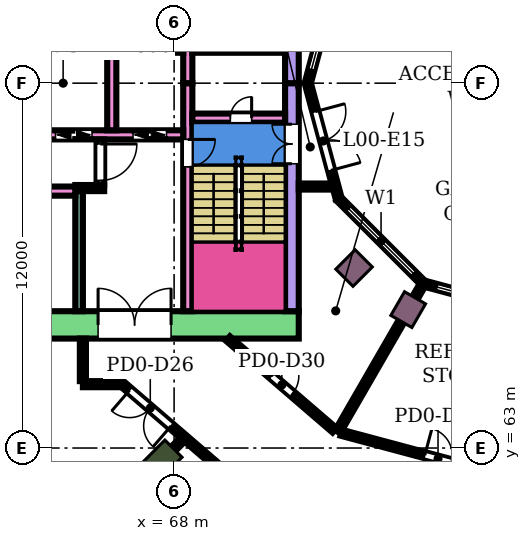
"""IFC4 building model, lengths in metres.
Left out: names, types, materials, properties, quantities, classifications, styles, units other than length and angle.
Written with IfcOpenShell. Run it as: python <this file> out.ifc"""

import sys

from ifc_helpers import new_model, si_unit, direction, frame, frame_2d, origin, origin_2d, place, context, subcontext, project, spatial, rectangle, extrude, element, fill, save


model = new_model("IFC4")
c1 = context("Model", 3, precision=1e-05, world=origin(), true_north=direction((0.0, 1.0)))
c2 = subcontext(c1, "Body", "Model", "MODEL_VIEW")
j1 = project(units=[si_unit("LENGTHUNIT", "METRE"), si_unit("PLANEANGLEUNIT", "RADIAN")], contexts=[c1])
p1 = place(None, origin())
s1 = spatial("IfcSite", under=j1, at=p1, CompositionType="ELEMENT")
p2 = place(p1, origin())
s2 = spatial("IfcBuilding", under=s1, at=p2, CompositionType="ELEMENT")
p3 = place(p2, origin())
s3 = spatial("IfcBuildingStorey", under=s2, at=p3, CompositionType="ELEMENT", Elevation=0.0)
p4 = place(p3, frame((67.555, 62.555, 0.0), z_axis=(0.0, 0.0, 1.0), x_axis=(-0.707106781187, -0.707106781187, 0.0)))
e1 = element("IfcColumn", 1, at=p4, inside=s3, PredefinedType="COLUMN", context=c2, shape_type="SweptSolid", body=[
    extrude(rectangle(XDim=1.2, YDim=0.8, at=origin_2d()), origin(), (0.0, 0.0, 1.0), 7.0),
])
for number, where, z_axis, x_axis in (
    (2, (73.919, 68.919, 0.0), (0.0, 0.0, 1.0), (-0.707, -0.707, 0.0)),
    (3, (75.7, 67.552, 0.0), (0.0, 0.0, 1.0), (-0.5, -0.866, 0.0)),
):
    element("IfcColumn", number, at=place(p3, frame(where, z_axis=z_axis, x_axis=x_axis)), inside=s3, PredefinedType="COLUMN", context=c2, shape_type="SweptSolid", body=[
        extrude(rectangle(XDim=0.9, YDim=0.8, at=origin_2d()), origin(), (0.0, 0.0, 1.0), 7.0),
    ])
p5 = place(p3, frame((72.1, 67.05, 0.0), z_axis=(0.0, 0.0, 1.0), x_axis=(-1.0, 0.0, 0.0)))
e4 = element("IfcWall", 4, at=p5, inside=s3, PredefinedType="SHEAR", context=c2, shape_type="SweptSolid", body=[
    extrude(rectangle(XDim=14.6, YDim=0.9, at=frame_2d((7.3, 0.0))), origin(), (0.0, 0.0, 1.0), 6.55),
])
p6 = place(p5, frame((4.2, 0.0, 0.0)))
e5 = element("IfcOpeningElement", 5, at=p6, cuts=e4, PredefinedType="OPENING", context=c2, shape_type="SweptSolid", body=[
    extrude(rectangle(XDim=2.4, YDim=2.4, at=frame_2d((1.2, 1.2))), frame((0.0, 0.46, 0.0), z_axis=(0.0, -1.0, 0.0), x_axis=(1.0, 0.0, 0.0)), (0.0, 0.0, 1.0), 0.92),
])
p7 = place(p3, frame((71.875, 75.0, 0.0), z_axis=(0.0, 0.0, 1.0), x_axis=(0.0, -1.0, 0.0)))
e6 = element("IfcWall", 6, at=p7, inside=s3, PredefinedType="SHEAR", context=c2, shape_type="SweptSolid", body=[
    extrude(rectangle(XDim=7.5, YDim=0.45, at=frame_2d((3.75, 0.0))), origin(), (0.0, 0.0, 1.0), 6.55),
])
p8 = place(p7, frame((1.35, 0.0, 0.0)))
e7 = element("IfcOpeningElement", 7, at=p8, cuts=e6, PredefinedType="OPENING", context=c2, shape_type="SweptSolid", body=[
    extrude(rectangle(XDim=1.3, YDim=2.4, at=frame_2d((0.65, 1.2))), frame((0.0, 0.235, 0.0), z_axis=(0.0, -1.0, 0.0), x_axis=(1.0, 0.0, 0.0)), (0.0, 0.0, 1.0), 0.47),
])
p9 = place(p3, frame((71.875, 82.5, 0.0), z_axis=(0.0, 0.0, 1.0), x_axis=(0.0, -1.0, 0.0)))
e8 = element("IfcWall", 8, at=p9, inside=s3, PredefinedType="SHEAR", context=c2, shape_type="SweptSolid", body=[
    extrude(rectangle(XDim=7.5, YDim=0.45, at=frame_2d((3.75, 0.0))), origin(), (0.0, 0.0, 1.0), 6.55),
])
p10 = place(p9, frame((0.05, 0.0, 0.0)))
e9 = element("IfcOpeningElement", 9, at=p10, cuts=e8, PredefinedType="OPENING", context=c2, shape_type="SweptSolid", body=[
    extrude(rectangle(XDim=1.3, YDim=2.4, at=frame_2d((0.65, 1.2))), frame((0.0, 0.235, 0.0), z_axis=(0.0, -1.0, 0.0), x_axis=(1.0, 0.0, 0.0)), (0.0, 0.0, 1.0), 0.47),
])
p11 = place(p3, frame((68.45, 75.0, 0.0), z_axis=(0.0, 0.0, 1.0), x_axis=(0.0, -1.0, 0.0)))
e10 = element("IfcWall", 10, at=p11, inside=s3, PredefinedType="SHEAR", context=c2, shape_type="SweptSolid", body=[
    extrude(rectangle(XDim=7.5, YDim=0.3, at=frame_2d((3.75, 0.0))), origin(), (0.0, 0.0, 1.0), 6.55),
])
p12 = place(p11, frame((1.85, 0.0, 0.0)))
e11 = element("IfcOpeningElement", 11, at=p12, cuts=e10, PredefinedType="OPENING", context=c2, shape_type="SweptSolid", body=[
    extrude(rectangle(XDim=0.9, YDim=2.1, at=frame_2d((0.45, 1.05))), frame((0.0, 0.16, 0.0), z_axis=(0.0, -1.0, 0.0), x_axis=(1.0, 0.0, 0.0)), (0.0, 0.0, 1.0), 0.32),
])
p13 = place(p3, frame((68.45, 82.5, 0.0), z_axis=(0.0, 0.0, 1.0), x_axis=(0.0, -1.0, 0.0)))
e12 = element("IfcWall", 12, at=p13, inside=s3, PredefinedType="SHEAR", context=c2, shape_type="SweptSolid", body=[
    extrude(rectangle(XDim=7.5, YDim=0.3, at=frame_2d((3.75, 0.0))), origin(), (0.0, 0.0, 1.0), 6.55),
])
p14 = place(p13, frame((0.15, 0.0, 0.0)))
e13 = element("IfcOpeningElement", 13, at=p14, cuts=e12, PredefinedType="OPENING", context=c2, shape_type="SweptSolid", body=[
    extrude(rectangle(XDim=0.9, YDim=2.1, at=frame_2d((0.45, 1.05))), frame((0.0, 0.16, 0.0), z_axis=(0.0, -1.0, 0.0), x_axis=(1.0, 0.0, 0.0)), (0.0, 0.0, 1.0), 0.32),
])
p15 = place(p3, frame((71.65, 73.85, 0.0), z_axis=(0.0, 0.0, 1.0), x_axis=(-1.0, 0.0, 0.0)))
e14 = element("IfcWall", 14, at=p15, inside=s3, PredefinedType="SHEAR", context=c2, shape_type="SweptSolid", body=[
    extrude(rectangle(XDim=3.05, YDim=0.3, at=frame_2d((1.525, 0.0))), origin(), (0.0, 0.0, 1.0), 6.55),
])
p16 = place(p15, frame((1.1, 0.0, 0.0)))
e15 = element("IfcOpeningElement", 15, at=p16, cuts=e14, PredefinedType="OPENING", context=c2, shape_type="SweptSolid", body=[
    extrude(rectangle(XDim=0.7, YDim=2.0, at=frame_2d((0.35, 1.0))), frame((0.0, 0.16, 0.0), z_axis=(0.0, -1.0, 0.0), x_axis=(1.0, 0.0, 0.0)), (0.0, 0.0, 1.0), 0.32),
])
p17 = place(p3, frame((71.65, 76.15, 0.0), z_axis=(0.0, 0.0, 1.0), x_axis=(-1.0, 0.0, 0.0)))
e16 = element("IfcWall", 16, at=p17, inside=s3, PredefinedType="SHEAR", context=c2, shape_type="SweptSolid", body=[
    extrude(rectangle(XDim=3.05, YDim=0.3, at=frame_2d((1.525, 0.0))), origin(), (0.0, 0.0, 1.0), 6.55),
])
p18 = place(p3, frame((68.3, 73.3, 0.0), z_axis=(0.0, 0.0, 1.0), x_axis=(-1.0, 0.0, 0.0)))
e17 = element("IfcWall", 17, at=p18, inside=s3, PredefinedType="SHEAR", context=c2, shape_type="SweptSolid", body=[
    extrude(rectangle(XDim=10.8, YDim=0.3, at=frame_2d((5.4, 0.0))), origin(), (0.0, 0.0, 1.0), 6.55),
])
p19 = place(p18, frame((0.55, 0.0, 0.0)))
e18 = element("IfcOpeningElement", 18, at=p19, cuts=e17, PredefinedType="OPENING", context=c2, shape_type="SweptSolid", body=[
    extrude(rectangle(XDim=1.1, YDim=2.1, at=frame_2d((0.55, 1.05))), frame((0.0, 0.16, 0.0), z_axis=(0.0, -1.0, 0.0), x_axis=(1.0, 0.0, 0.0)), (0.0, 0.0, 1.0), 0.32),
])
p20 = place(p18, frame((3.0, 0.0, 0.0)))
e19 = element("IfcOpeningElement", 19, at=p20, cuts=e17, PredefinedType="OPENING", context=c2, shape_type="SweptSolid", body=[
    extrude(rectangle(XDim=1.2, YDim=2.1, at=frame_2d((0.6, 1.05))), frame((0.0, 0.16, 0.0), z_axis=(0.0, -1.0, 0.0), x_axis=(1.0, 0.0, 0.0)), (0.0, 0.0, 1.0), 0.32),
])
p21 = place(p18, frame((5.5, 0.0, 0.0)))
e20 = element("IfcOpeningElement", 20, at=p21, cuts=e17, PredefinedType="OPENING", context=c2, shape_type="SweptSolid", body=[
    extrude(rectangle(XDim=1.2, YDim=2.1, at=frame_2d((0.6, 1.05))), frame((0.0, 0.16, 0.0), z_axis=(0.0, -1.0, 0.0), x_axis=(1.0, 0.0, 0.0)), (0.0, 0.0, 1.0), 0.32),
])
p22 = place(p18, frame((8.1, 0.0, 0.0)))
e21 = element("IfcOpeningElement", 21, at=p22, cuts=e17, PredefinedType="OPENING", context=c2, shape_type="SweptSolid", body=[
    extrude(rectangle(XDim=1.0, YDim=2.1, at=frame_2d((0.5, 1.05))), frame((0.0, 0.16, 0.0), z_axis=(0.0, -1.0, 0.0), x_axis=(1.0, 0.0, 0.0)), (0.0, 0.0, 1.0), 0.32),
])
p23 = place(p3, frame((65.95, 76.0, 0.0), z_axis=(0.0, 0.0, 1.0), x_axis=(0.0, -1.0, 0.0)))
e22 = element("IfcWall", 22, at=p23, inside=s3, PredefinedType="SHEAR", context=c2, shape_type="SweptSolid", body=[
    extrude(rectangle(XDim=2.55, YDim=0.3, at=frame_2d((1.275, 0.0))), origin(), (0.0, 0.0, 1.0), 6.55),
])
p24 = place(p3, frame((64.875, 71.45, 0.0), z_axis=(0.0, 0.0, 1.0), x_axis=(0.0, -1.0, 0.0)))
e23 = element("IfcWall", 23, at=p24, inside=s3, PredefinedType="SHEAR", context=c2, shape_type="SweptSolid", body=[
    extrude(rectangle(XDim=3.95, YDim=0.25, at=frame_2d((1.975, 0.0))), origin(), (0.0, 0.0, 1.0), 6.55),
])
p25 = place(p3, frame((65.7, 71.55, 0.0), z_axis=(0.0, 0.0, 1.0), x_axis=(-1.0, 0.0, 0.0)))
e24 = element("IfcWall", 24, at=p25, inside=s3, PredefinedType="SHEAR", context=c2, shape_type="SweptSolid", body=[
    extrude(rectangle(XDim=0.95, YDim=0.2, at=frame_2d((0.475, 0.0))), origin(), (0.0, 0.0, 1.0), 6.55),
])
p26 = place(p3, frame((65.575, 73.15, 0.0), z_axis=(0.0, 0.0, 1.0), x_axis=(0.0, -1.0, 0.0)))
e25 = element("IfcWall", 25, at=p26, inside=s3, PredefinedType="SHEAR", context=c2, shape_type="SweptSolid", body=[
    extrude(rectangle(XDim=1.5, YDim=0.25, at=frame_2d((0.75, 0.0))), origin(), (0.0, 0.0, 1.0), 6.55),
])
p27 = place(p26, frame((0.15, 0.0, 0.0)))
e26 = element("IfcOpeningElement", 26, at=p27, cuts=e25, PredefinedType="OPENING", context=c2, shape_type="SweptSolid", body=[
    extrude(rectangle(XDim=1.2, YDim=2.1, at=frame_2d((0.6, 1.05))), frame((0.0, 0.135, 0.0), z_axis=(0.0, -1.0, 0.0), x_axis=(1.0, 0.0, 0.0)), (0.0, 0.0, 1.0), 0.27),
])
p28 = place(p3, frame((64.75, 71.45, 0.0), z_axis=(0.0, 0.0, 1.0), x_axis=(-1.0, 0.0, 0.0)))
e27 = element("IfcWall", 27, at=p28, inside=s3, PredefinedType="SHEAR", context=c2, shape_type="SweptSolid", body=[
    extrude(rectangle(XDim=7.25, YDim=0.3, at=frame_2d((3.625, 0.0))), origin(), (0.0, 0.0, 1.0), 6.55),
])
p29 = place(p28, frame((3.35, 0.0, 0.0)))
e28 = element("IfcOpeningElement", 28, at=p29, cuts=e27, PredefinedType="OPENING", context=c2, shape_type="SweptSolid", body=[
    extrude(rectangle(XDim=0.9, YDim=2.1, at=frame_2d((0.45, 1.05))), frame((0.0, 0.16, 0.0), z_axis=(0.0, -1.0, 0.0), x_axis=(1.0, 0.0, 0.0)), (0.0, 0.0, 1.0), 0.32),
])
p30 = place(p3, frame((73.415, 78.802, 0.0), z_axis=(0.0, 0.0, 1.0), x_axis=(-0.258789828301, -0.965933654434, 0.0)))
e29 = element("IfcWall", 29, at=p30, inside=s3, PredefinedType="NOTDEFINED", context=c2, shape_type="SweptSolid", body=[
    extrude(rectangle(XDim=3.936, YDim=0.2, at=frame_2d((1.968, 0.0))), origin(), (0.0, 0.0, 1.0), 7.0),
])
p31 = place(p30, frame((0.468, 0.0, 0.9)))
e30 = element("IfcOpeningElement", 30, at=p31, cuts=e29, PredefinedType="OPENING", context=c2, shape_type="SweptSolid", body=[
    extrude(rectangle(XDim=3.0, YDim=2.3, at=frame_2d((1.5, 1.15))), frame((0.0, 0.11, 0.0), z_axis=(0.0, -1.0, 0.0), x_axis=(1.0, 0.0, 0.0)), (0.0, 0.0, 1.0), 0.22),
])
p32 = place(p3, frame((72.396, 75.0, 0.0), z_axis=(0.0, 0.0, 1.0), x_axis=(0.258789828301, -0.965933654434, 0.0)))
e31 = element("IfcWall", 31, at=p32, inside=s3, PredefinedType="NOTDEFINED", context=c2, shape_type="SweptSolid", body=[
    extrude(rectangle(XDim=3.936, YDim=0.2, at=frame_2d((1.968, 0.0))), origin(), (0.0, 0.0, 1.0), 7.0),
])
p33 = place(p32, frame((0.968, 0.0, 0.0)))
e32 = element("IfcOpeningElement", 32, at=p33, cuts=e31, PredefinedType="OPENING", context=c2, shape_type="SweptSolid", body=[
    extrude(rectangle(XDim=2.0, YDim=2.4, at=frame_2d((1.0, 1.2))), frame((0.0, 0.11, 0.0), z_axis=(0.0, -1.0, 0.0), x_axis=(1.0, 0.0, 0.0)), (0.0, 0.0, 1.0), 0.22),
])
p34 = place(p3, frame((73.415, 71.198, 0.0), z_axis=(0.0, 0.0, 1.0), x_axis=(0.707106781187, -0.707106781187, 0.0)))
e33 = element("IfcWall", 33, at=p34, inside=s3, PredefinedType="NOTDEFINED", context=c2, shape_type="SweptSolid", body=[
    extrude(rectangle(XDim=3.936, YDim=0.2, at=frame_2d((1.968, 0.0))), origin(), (0.0, 0.0, 1.0), 7.0),
])
p35 = place(p34, frame((0.468, 0.0, 0.9)))
e34 = element("IfcOpeningElement", 34, at=p35, cuts=e33, PredefinedType="OPENING", context=c2, shape_type="SweptSolid", body=[
    extrude(rectangle(XDim=3.0, YDim=2.3, at=frame_2d((1.5, 1.15))), frame((0.0, 0.11, 0.0), z_axis=(0.0, -1.0, 0.0), x_axis=(1.0, 0.0, 0.0)), (0.0, 0.0, 1.0), 0.22),
])
p36 = place(p3, frame((76.198, 68.415, 0.0), z_axis=(0.0, 0.0, 1.0), x_axis=(0.965933654434, -0.258789828301, 0.0)))
e35 = element("IfcWall", 35, at=p36, inside=s3, PredefinedType="NOTDEFINED", context=c2, shape_type="SweptSolid", body=[
    extrude(rectangle(XDim=3.936, YDim=0.2, at=frame_2d((1.968, 0.0))), origin(), (0.0, 0.0, 1.0), 7.0),
])
p37 = place(p36, frame((0.468, 0.0, 0.9)))
e36 = element("IfcOpeningElement", 36, at=p37, cuts=e35, PredefinedType="OPENING", context=c2, shape_type="SweptSolid", body=[
    extrude(rectangle(XDim=3.0, YDim=2.3, at=frame_2d((1.5, 1.15))), frame((0.0, 0.11, 0.0), z_axis=(0.0, -1.0, 0.0), x_axis=(1.0, 0.0, 0.0)), (0.0, 0.0, 1.0), 0.22),
])
p38 = place(p3, frame((47.615, 42.615, 0.0), z_axis=(0.0, 0.0, 1.0), x_axis=(0.707106781187, 0.707106781187, 0.0)))
e37 = element("IfcWall", 37, at=p38, inside=s3, PredefinedType="PARTITIONING", context=c2, shape_type="SweptSolid", body=[
    extrude(rectangle(XDim=29.203, YDim=0.2, at=frame_2d((14.602, 0.0))), origin(), (0.0, 0.0, 1.0), 5.65),
])
p39 = place(p3, frame((65.0, 65.2, 0.0), z_axis=(0.0, 0.0, 1.0), x_axis=(0.0, 1.0, 0.0)))
e38 = element("IfcWall", 38, at=p39, inside=s3, PredefinedType="PARTITIONING", context=c2, shape_type="SweptSolid", body=[
    extrude(rectangle(XDim=1.399, YDim=0.2, at=frame_2d((0.7, 0.0))), origin(), (0.0, 0.0, 1.0), 6.55),
])
p40 = place(p3, frame((65.0, 65.1, 0.0), z_axis=(0.0, 0.0, 1.0), x_axis=(1.0, 0.0, 0.0)))
e39 = element("IfcWall", 39, at=p40, inside=s3, PredefinedType="PARTITIONING", context=c2, shape_type="SweptSolid", body=[
    extrude(rectangle(XDim=1.242, YDim=0.2, at=frame_2d((0.621, 0.0))), origin(), (0.0, 0.0, 1.0), 6.55),
])
p41 = place(p3, frame((66.302, 65.1, 0.0), z_axis=(0.0, 0.0, 1.0), x_axis=(0.757895579626, -0.652375881209, 0.0)))
e40 = element("IfcWall", 40, at=p41, inside=s3, PredefinedType="PARTITIONING", context=c2, shape_type="SweptSolid", body=[
    extrude(rectangle(XDim=7.062, YDim=0.2, at=frame_2d((3.531, 0.0))), origin(), (0.0, 0.0, 1.0), 6.55),
])
p42 = place(p41, frame((3.964, 0.0, 0.0)))
e41 = element("IfcOpeningElement", 41, at=p42, cuts=e40, PredefinedType="OPENING", context=c2, shape_type="SweptSolid", body=[
    extrude(rectangle(XDim=1.8, YDim=2.1, at=frame_2d((0.9, 1.05))), frame((0.0, 0.11, 0.0), z_axis=(0.0, -1.0, 0.0), x_axis=(1.0, 0.0, 0.0)), (0.0, 0.0, 1.0), 0.22),
])
p43 = place(p41, frame((0.306, 0.0, 0.0)))
e42 = element("IfcOpeningElement", 42, at=p43, cuts=e40, PredefinedType="OPENING", context=c2, shape_type="SweptSolid", body=[
    extrude(rectangle(XDim=1.8, YDim=2.1, at=frame_2d((0.9, 1.05))), frame((0.0, 0.11, 0.0), z_axis=(0.0, -1.0, 0.0), x_axis=(1.0, 0.0, 0.0)), (0.0, 0.0, 1.0), 0.22),
])
p44 = place(p3, frame((69.771, 66.6, 0.0), z_axis=(0.0, 0.0, 1.0), x_axis=(0.758040611529, -0.652207352974, 0.0)))
e43 = element("IfcWall", 43, at=p44, inside=s3, PredefinedType="PARTITIONING", context=c2, shape_type="SweptSolid", body=[
    extrude(rectangle(XDim=4.625, YDim=0.2, at=frame_2d((2.312, 0.0))), origin(), (0.0, 0.0, 1.0), 6.55),
])
p45 = place(p44, frame((1.887, 0.0, 0.0)))
e44 = element("IfcOpeningElement", 44, at=p45, cuts=e43, PredefinedType="OPENING", context=c2, shape_type="SweptSolid", body=[
    extrude(rectangle(XDim=0.9, YDim=2.1, at=frame_2d((0.45, 1.05))), frame((0.0, 0.11, 0.0), z_axis=(0.0, -1.0, 0.0), x_axis=(1.0, 0.0, 0.0)), (0.0, 0.0, 1.0), 0.22),
])
p46 = place(p3, frame((73.499, 63.502, 0.0), z_axis=(0.0, 0.0, 1.0), x_axis=(0.965923617359, -0.258827288799, 0.0)))
e45 = element("IfcWall", 45, at=p46, inside=s3, PredefinedType="PARTITIONING", context=c2, shape_type="SweptSolid", body=[
    extrude(rectangle(XDim=6.601, YDim=0.2, at=frame_2d((3.3, 0.0))), origin(), (0.0, 0.0, 1.0), 6.55),
])
p47 = place(p46, frame((2.844, 0.0, 0.0)))
e46 = element("IfcOpeningElement", 46, at=p47, cuts=e45, PredefinedType="OPENING", context=c2, shape_type="SweptSolid", body=[
    extrude(rectangle(XDim=0.9, YDim=2.1, at=frame_2d((0.45, 1.05))), frame((0.0, 0.11, 0.0), z_axis=(0.0, -1.0, 0.0), x_axis=(1.0, 0.0, 0.0)), (0.0, 0.0, 1.0), 0.22),
])
p48 = place(p3, frame((73.379, 63.534, 0.0), z_axis=(0.0, 0.0, 1.0), x_axis=(0.500033892615, 0.86600583499, 0.0)))
e47 = element("IfcWall", 47, at=p48, inside=s3, PredefinedType="PARTITIONING", context=c2, shape_type="SweptSolid", body=[
    extrude(rectangle(XDim=5.542, YDim=0.2, at=frame_2d((2.771, 0.0))), origin(), (0.0, 0.0, 1.0), 6.55),
])
p49 = place(p3, frame((73.204, 71.6, 0.0), z_axis=(0.0, 0.0, 1.0), x_axis=(-1.0, 0.0, 0.0)))
e48 = element("IfcWall", 48, at=p49, inside=s3, PredefinedType="PARTITIONING", context=c2, shape_type="SweptSolid", body=[
    extrude(rectangle(XDim=1.104, YDim=0.2, at=frame_2d((0.552, 0.0))), origin(), (0.0, 0.0, 1.0), 6.55),
])
p50 = place(p31, origin())
e49 = element("IfcWindow", 49, at=p50, inside=s3, PartitioningType="SINGLE_PANEL", PredefinedType="WINDOW", context=c2, shape_type="SweptSolid", body=[
    extrude(rectangle(XDim=3.0, YDim=2.3, at=frame_2d((1.5, 1.15))), frame((0.0, 0.03, 0.0), z_axis=(0.0, -1.0, 0.0), x_axis=(1.0, 0.0, 0.0)), (0.0, 0.0, 1.0), 0.06),
])
fill(e30, e49)
p51 = place(p33, origin())
e50 = element("IfcDoor", 50, at=p51, inside=s3, OperationType="DOUBLE_DOOR_SINGLE_SWING", PredefinedType="DOOR", context=c2, shape_type="SweptSolid", body=[
    extrude(rectangle(XDim=2.0, YDim=2.4, at=frame_2d((1.0, 1.2))), frame((0.0, 0.025, 0.0), z_axis=(0.0, -1.0, 0.0), x_axis=(1.0, 0.0, 0.0)), (0.0, 0.0, 1.0), 0.05),
])
fill(e32, e50)
p52 = place(p35, origin())
e51 = element("IfcWindow", 51, at=p52, inside=s3, PartitioningType="SINGLE_PANEL", PredefinedType="WINDOW", context=c2, shape_type="SweptSolid", body=[
    extrude(rectangle(XDim=3.0, YDim=2.3, at=frame_2d((1.5, 1.15))), frame((0.0, 0.03, 0.0), z_axis=(0.0, -1.0, 0.0), x_axis=(1.0, 0.0, 0.0)), (0.0, 0.0, 1.0), 0.06),
])
fill(e34, e51)
p53 = place(p37, origin())
e52 = element("IfcWindow", 52, at=p53, inside=s3, PartitioningType="SINGLE_PANEL", PredefinedType="WINDOW", context=c2, shape_type="SweptSolid", body=[
    extrude(rectangle(XDim=3.0, YDim=2.3, at=frame_2d((1.5, 1.15))), frame((0.0, 0.03, 0.0), z_axis=(0.0, -1.0, 0.0), x_axis=(1.0, 0.0, 0.0)), (0.0, 0.0, 1.0), 0.06),
])
fill(e36, e52)
p54 = place(p43, frame((1.8, 0.0, 0.0), z_axis=(0.0, 0.0, 1.0), x_axis=(-1.0, 0.0, 0.0)))
e53 = element("IfcDoor", 53, at=p54, inside=s3, OperationType="DOUBLE_DOOR_SINGLE_SWING", PredefinedType="DOOR", context=c2, shape_type="SweptSolid", body=[
    extrude(rectangle(XDim=1.8, YDim=2.1, at=frame_2d((0.9, 1.05))), frame((0.0, 0.025, 0.0), z_axis=(0.0, -1.0, 0.0), x_axis=(1.0, 0.0, 0.0)), (0.0, 0.0, 1.0), 0.05),
])
fill(e42, e53)
p55 = place(p47, origin())
e54 = element("IfcDoor", 54, at=p55, inside=s3, OperationType="SINGLE_SWING_LEFT", PredefinedType="DOOR", context=c2, shape_type="SweptSolid", body=[
    extrude(rectangle(XDim=0.9, YDim=2.1, at=frame_2d((0.45, 1.05))), frame((0.0, 0.025, 0.0), z_axis=(0.0, -1.0, 0.0), x_axis=(1.0, 0.0, 0.0)), (0.0, 0.0, 1.0), 0.05),
])
fill(e46, e54)
p56 = place(p45, origin())
e55 = element("IfcDoor", 55, at=p56, inside=s3, OperationType="SINGLE_SWING_LEFT", PredefinedType="DOOR", context=c2, shape_type="SweptSolid", body=[
    extrude(rectangle(XDim=0.9, YDim=2.1, at=frame_2d((0.45, 1.05))), frame((0.0, 0.025, 0.0), z_axis=(0.0, -1.0, 0.0), x_axis=(1.0, 0.0, 0.0)), (0.0, 0.0, 1.0), 0.05),
])
fill(e44, e55)
p57 = place(p16, frame((0.7, 0.0, 0.0), z_axis=(0.0, 0.0, 1.0), x_axis=(-1.0, 0.0, 0.0)))
e56 = element("IfcDoor", 56, at=p57, inside=s3, OperationType="SINGLE_SWING_RIGHT", PredefinedType="DOOR", context=c2, shape_type="SweptSolid", body=[
    extrude(rectangle(XDim=0.7, YDim=2.0, at=frame_2d((0.35, 1.0))), frame((0.0, 0.025, 0.0), z_axis=(0.0, -1.0, 0.0), x_axis=(1.0, 0.0, 0.0)), (0.0, 0.0, 1.0), 0.05),
])
fill(e15, e56)
p58 = place(p12, origin())
e57 = element("IfcDoor", 57, at=p58, inside=s3, OperationType="SINGLE_SWING_LEFT", PredefinedType="DOOR", context=c2, shape_type="SweptSolid", body=[
    extrude(rectangle(XDim=0.9, YDim=2.1, at=frame_2d((0.45, 1.05))), frame((0.0, 0.025, 0.0), z_axis=(0.0, -1.0, 0.0), x_axis=(1.0, 0.0, 0.0)), (0.0, 0.0, 1.0), 0.05),
])
fill(e11, e57)
p59 = place(p8, frame((1.3, 0.0, 0.0), z_axis=(0.0, 0.0, 1.0), x_axis=(-1.0, 0.0, 0.0)))
e58 = element("IfcDoor", 58, at=p59, inside=s3, OperationType="DOUBLE_DOOR_SINGLE_SWING", PredefinedType="DOOR", context=c2, shape_type="SweptSolid", body=[
    extrude(rectangle(XDim=1.3, YDim=2.4, at=frame_2d((0.65, 1.2))), frame((0.0, 0.025, 0.0), z_axis=(0.0, -1.0, 0.0), x_axis=(1.0, 0.0, 0.0)), (0.0, 0.0, 1.0), 0.05),
])
fill(e7, e58)
p60 = place(p19, origin())
e59 = element("IfcDoor", 59, at=p60, inside=s3, OperationType="DOUBLE_DOOR_SLIDING", PredefinedType="DOOR", context=c2, shape_type="SweptSolid", body=[
    extrude(rectangle(XDim=1.1, YDim=2.1, at=frame_2d((0.55, 1.05))), frame((0.0, 0.025, 0.0), z_axis=(0.0, -1.0, 0.0), x_axis=(1.0, 0.0, 0.0)), (0.0, 0.0, 1.0), 0.05),
])
fill(e18, e59)
p61 = place(p20, origin())
e60 = element("IfcDoor", 60, at=p61, inside=s3, OperationType="DOUBLE_DOOR_SLIDING", PredefinedType="DOOR", context=c2, shape_type="SweptSolid", body=[
    extrude(rectangle(XDim=1.2, YDim=2.1, at=frame_2d((0.6, 1.05))), frame((0.0, 0.025, 0.0), z_axis=(0.0, -1.0, 0.0), x_axis=(1.0, 0.0, 0.0)), (0.0, 0.0, 1.0), 0.05),
])
fill(e19, e60)
p62 = place(p27, origin())
e61 = element("IfcDoor", 61, at=p62, inside=s3, OperationType="SINGLE_SWING_LEFT", PredefinedType="DOOR", context=c2, shape_type="SweptSolid", body=[
    extrude(rectangle(XDim=1.2, YDim=2.1, at=frame_2d((0.6, 1.05))), frame((0.0, 0.025, 0.0), z_axis=(0.0, -1.0, 0.0), x_axis=(1.0, 0.0, 0.0)), (0.0, 0.0, 1.0), 0.05),
])
fill(e26, e61)
p63 = place(p6, frame((2.4, 0.0, 0.0), z_axis=(0.0, 0.0, 1.0), x_axis=(-1.0, 0.0, 0.0)))
e62 = element("IfcDoor", 62, at=p63, inside=s3, OperationType="DOUBLE_DOOR_SINGLE_SWING", PredefinedType="DOOR", context=c2, shape_type="SweptSolid", body=[
    extrude(rectangle(XDim=2.4, YDim=2.4, at=frame_2d((1.2, 1.2))), frame((0.0, 0.025, 0.0), z_axis=(0.0, -1.0, 0.0), x_axis=(1.0, 0.0, 0.0)), (0.0, 0.0, 1.0), 0.05),
])
fill(e5, e62)
save(model, sys.argv[1])
